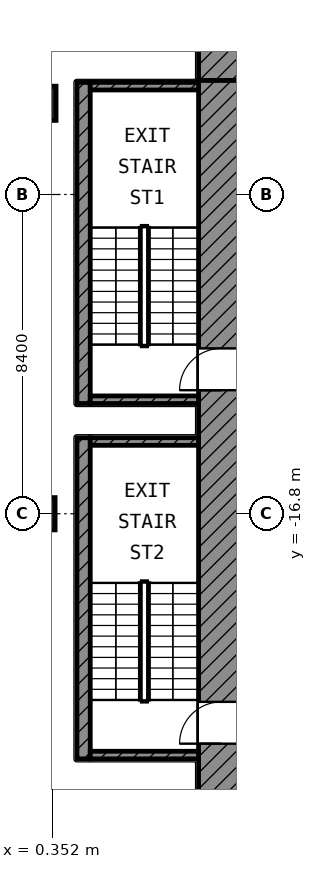
"""IFC4 building model, lengths in metres.
Left out: names, types, materials, properties, quantities, classifications, styles, units other than length and angle.
Written with IfcOpenShell. Run it as: python <this file> out.ifc"""

import sys

from ifc_helpers import new_model, si_unit, direction, frame, frame_2d, origin, origin_2d, place, context, subcontext, project, spatial, rectangle, extrude, element, fill, save


model = new_model("IFC4")
c1 = context("Model", 3, precision=1e-05, world=origin(), true_north=direction((0.0, 1.0)))
c2 = subcontext(c1, "Body", "Model", "MODEL_VIEW")
j1 = project(units=[si_unit("LENGTHUNIT", "METRE"), si_unit("PLANEANGLEUNIT", "RADIAN")], contexts=[c1])
p1 = place(None, origin())
s1 = spatial("IfcSite", under=j1, at=p1, CompositionType="ELEMENT")
p2 = place(p1, origin())
s2 = spatial("IfcBuilding", under=s1, at=p2, CompositionType="ELEMENT")
p3 = place(p2, frame((0.0, 0.0, 260.0)))
s3 = spatial("IfcBuildingStorey", under=s2, at=p3, CompositionType="ELEMENT", Elevation=260.0)
p4 = place(p3, frame((0.0, -6.0, 0.0), z_axis=(0.0, 0.0, 1.0), x_axis=(1.0, 0.0, 0.0)))
e1 = element("IfcColumn", 1, at=p4, inside=s3, PredefinedType="COLUMN", context=c2, shape_type="SweptSolid", body=[
    extrude(rectangle(XDim=0.9, YDim=0.9, at=origin_2d()), origin(), (0.0, 0.0, 1.0), 4.2),
])
p5 = place(p3, frame((0.0, -16.8, 0.0), z_axis=(0.0, 0.0, 1.0), x_axis=(1.0, 0.0, 0.0)))
e2 = element("IfcColumn", 2, at=p5, inside=s3, PredefinedType="COLUMN", context=c2, shape_type="SweptSolid", body=[
    extrude(rectangle(XDim=0.85, YDim=0.85, at=origin_2d()), origin(), (0.0, 0.0, 1.0), 4.2),
])
p6 = place(p3, frame((4.2, -4.8, 0.0), z_axis=(0.0, 0.0, 1.0), x_axis=(1.0, 0.0, 0.0)))
e3 = element("IfcWall", 3, at=p6, inside=s3, PredefinedType="SHEAR", context=c2, shape_type="SweptSolid", body=[
    extrude(rectangle(XDim=20.6, YDim=1.2, at=frame_2d((10.3, 0.0))), origin(), (0.0, 0.0, 1.0), 3.6),
])
p7 = place(p6, frame((1.95, 0.0, 0.0)))
e4 = element("IfcOpeningElement", 4, at=p7, cuts=e3, PredefinedType="OPENING", context=c2, shape_type="SweptSolid", body=[
    extrude(rectangle(XDim=1.1, YDim=2.1, at=frame_2d((0.55, 1.05))), frame((0.0, 0.61, 0.0), z_axis=(0.0, -1.0, 0.0), x_axis=(1.0, 0.0, 0.0)), (0.0, 0.0, 1.0), 1.22),
])
p8 = place(p6, frame((17.95, 0.0, 0.0)))
e5 = element("IfcOpeningElement", 5, at=p8, cuts=e3, PredefinedType="OPENING", context=c2, shape_type="SweptSolid", body=[
    extrude(rectangle(XDim=1.1, YDim=2.1, at=frame_2d((0.55, 1.05))), frame((0.0, 0.61, 0.0), z_axis=(0.0, -1.0, 0.0), x_axis=(1.0, 0.0, 0.0)), (0.0, 0.0, 1.0), 1.22),
])
p9 = place(p3, frame((4.8, -24.8, 0.0), z_axis=(0.0, 0.0, 1.0), x_axis=(0.0, 1.0, 0.0)))
e6 = element("IfcWall", 6, at=p9, inside=s3, PredefinedType="SHEAR", context=c2, shape_type="SweptSolid", body=[
    extrude(rectangle(XDim=19.4, YDim=1.2, at=frame_2d((9.7, 0.0))), origin(), (0.0, 0.0, 1.0), 3.6),
])
p10 = place(p9, frame((11.25, 0.0, 0.0)))
e7 = element("IfcOpeningElement", 7, at=p10, cuts=e6, PredefinedType="OPENING", context=c2, shape_type="SweptSolid", body=[
    extrude(rectangle(XDim=1.1, YDim=2.1, at=frame_2d((0.55, 1.05))), frame((0.0, 0.61, 0.0), z_axis=(0.0, -1.0, 0.0), x_axis=(1.0, 0.0, 0.0)), (0.0, 0.0, 1.0), 1.22),
])
p11 = place(p9, frame((1.95, 0.0, 0.0)))
e8 = element("IfcOpeningElement", 8, at=p11, cuts=e6, PredefinedType="OPENING", context=c2, shape_type="SweptSolid", body=[
    extrude(rectangle(XDim=1.1, YDim=2.1, at=frame_2d((0.55, 1.05))), frame((0.0, 0.61, 0.0), z_axis=(0.0, -1.0, 0.0), x_axis=(1.0, 0.0, 0.0)), (0.0, 0.0, 1.0), 1.22),
])
p12 = place(p3, frame((1.175, -13.9, 0.0), z_axis=(0.0, 0.0, 1.0), x_axis=(0.0, 1.0, 0.0)))
e9 = element("IfcWall", 9, at=p12, inside=s3, PredefinedType="SHEAR", context=c2, shape_type="SweptSolid", body=[
    extrude(rectangle(XDim=8.45, YDim=0.35, at=frame_2d((4.225, 0.0))), origin(), (0.0, 0.0, 1.0), 3.6),
])
for number, where, z_axis, x_axis in (
    (10, (1.35, -5.55, 0.0), (0.0, 0.0, 1.0), (1.0, 0.0, 0.0)),
    (11, (1.35, -13.8, 0.0), (0.0, 0.0, 1.0), (1.0, 0.0, 0.0)),
):
    element("IfcWall", number, at=place(p3, frame(where, z_axis=z_axis, x_axis=x_axis)), inside=s3, PredefinedType="SHEAR", context=c2, shape_type="SweptSolid", body=[
        extrude(rectangle(XDim=2.85, YDim=0.2, at=frame_2d((1.425, 0.0))), origin(), (0.0, 0.0, 1.0), 3.6),
    ])
p13 = place(p3, frame((1.175, -23.25, 0.0), z_axis=(0.0, 0.0, 1.0), x_axis=(0.0, 1.0, 0.0)))
e12 = element("IfcWall", 12, at=p13, inside=s3, PredefinedType="SHEAR", context=c2, shape_type="SweptSolid", body=[
    extrude(rectangle(XDim=8.45, YDim=0.35, at=frame_2d((4.225, 0.0))), origin(), (0.0, 0.0, 1.0), 3.6),
])
for number, where, z_axis, x_axis in (
    (13, (1.35, -14.9, 0.0), (0.0, 0.0, 1.0), (1.0, 0.0, 0.0)),
    (14, (1.35, -23.15, 0.0), (0.0, 0.0, 1.0), (1.0, 0.0, 0.0)),
):
    element("IfcWall", number, at=place(p3, frame(where, z_axis=z_axis, x_axis=x_axis)), inside=s3, PredefinedType="SHEAR", context=c2, shape_type="SweptSolid", body=[
        extrude(rectangle(XDim=2.85, YDim=0.2, at=frame_2d((1.425, 0.0))), origin(), (0.0, 0.0, 1.0), 3.6),
    ])
p14 = place(p10, origin())
e15 = element("IfcDoor", 15, at=p14, inside=s3, OperationType="SINGLE_SWING_LEFT", PredefinedType="DOOR", context=c2, shape_type="SweptSolid", body=[
    extrude(rectangle(XDim=1.1, YDim=2.1, at=frame_2d((0.55, 1.05))), frame((0.0, 0.025, 0.0), z_axis=(0.0, -1.0, 0.0), x_axis=(1.0, 0.0, 0.0)), (0.0, 0.0, 1.0), 0.05),
])
fill(e7, e15)
p15 = place(p11, origin())
e16 = element("IfcDoor", 16, at=p15, inside=s3, OperationType="SINGLE_SWING_LEFT", PredefinedType="DOOR", context=c2, shape_type="SweptSolid", body=[
    extrude(rectangle(XDim=1.1, YDim=2.1, at=frame_2d((0.55, 1.05))), frame((0.0, 0.025, 0.0), z_axis=(0.0, -1.0, 0.0), x_axis=(1.0, 0.0, 0.0)), (0.0, 0.0, 1.0), 0.05),
])
fill(e8, e16)
save(model, sys.argv[1])
